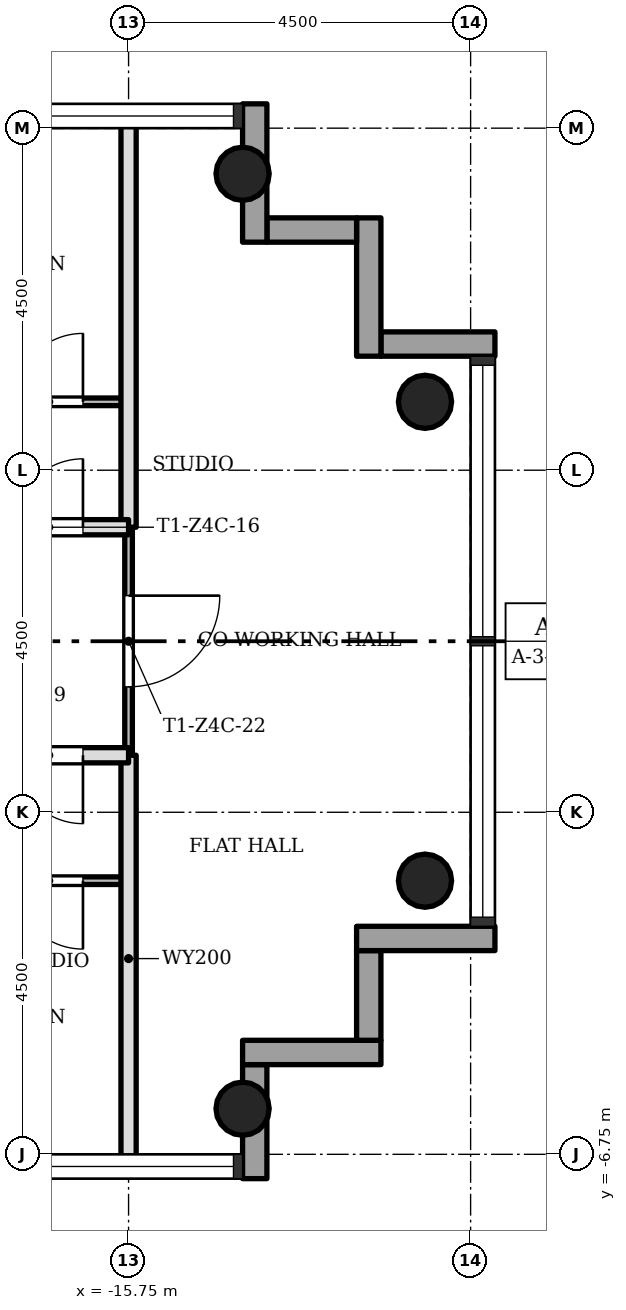
"""IFC4 building model, lengths in metres.
Left out: names, types, materials, properties, quantities, classifications, styles, units other than length and angle.
Written with IfcOpenShell. Run it as: python <this file> out.ifc"""

import sys

from ifc_helpers import new_model, si_unit, direction, frame, frame_2d, origin, origin_2d, place, context, subcontext, project, spatial, rectangle, hollow_circle, extrude, element, fill, save


model = new_model("IFC4")
c1 = context("Model", 3, precision=1e-05, world=origin(), true_north=direction((0.0, 1.0)))
c2 = subcontext(c1, "Body", "Model", "MODEL_VIEW")
j1 = project(units=[si_unit("LENGTHUNIT", "METRE"), si_unit("PLANEANGLEUNIT", "RADIAN")], contexts=[c1])
p1 = place(None, origin())
s1 = spatial("IfcSite", under=j1, at=p1, CompositionType="ELEMENT")
p2 = place(p1, origin())
s2 = spatial("IfcBuilding", under=s1, at=p2, CompositionType="ELEMENT")
p3 = place(p2, frame((0.0, 0.0, 185.8)))
s3 = spatial("IfcBuildingStorey", under=s2, at=p3, CompositionType="ELEMENT", Elevation=185.8)
for number, where, z_axis, x_axis in (
    (1, (-14.25, -6.15, 0.0), (0.0, 0.0, 1.0), (1.0, 0.0, 0.0)),
    (2, (-14.25, 6.15, 0.0), (0.0, 0.0, 1.0), (1.0, 0.0, 0.0)),
    (3, (-11.85, -3.15, 0.0), (0.0, 0.0, 1.0), (1.0, 0.0, 0.0)),
    (4, (-11.85, 3.15, 0.0), (0.0, 0.0, 1.0), (1.0, 0.0, 0.0)),
):
    element("IfcColumn", number, at=place(p3, frame(where, z_axis=z_axis, x_axis=x_axis)), inside=s3, PredefinedType="COLUMN", context=c2, shape_type="SweptSolid", body=[
        extrude(hollow_circle(Radius=0.35, WallThickness=0.025, at=origin_2d()), origin(), (0.0, 0.0, 1.0), 3.4),
    ])
p4 = place(p3, frame((-14.09, -7.07, -0.3), z_axis=(0.0, 0.0, 1.0), x_axis=(0.0, 1.0, 0.0)))
e5 = element("IfcWall", 5, at=p4, inside=s3, PredefinedType="STANDARD", context=c2, shape_type="SweptSolid", body=[
    extrude(rectangle(XDim=1.5, YDim=0.32, at=frame_2d((0.75, 0.0))), origin(), (0.0, 0.0, 1.0), 3.4),
])
p5 = place(p3, frame((-14.25, -5.41, -0.3), z_axis=(0.0, 0.0, 1.0), x_axis=(1.0, 0.0, 0.0)))
e6 = element("IfcWall", 6, at=p5, inside=s3, PredefinedType="STANDARD", context=c2, shape_type="SweptSolid", body=[
    extrude(rectangle(XDim=1.82, YDim=0.32, at=frame_2d((0.91, 0.0))), origin(), (0.0, 0.0, 1.0), 3.4),
])
p6 = place(p3, frame((-12.59, -5.25, -0.3), z_axis=(0.0, 0.0, 1.0), x_axis=(0.0, 1.0, 0.0)))
e7 = element("IfcWall", 7, at=p6, inside=s3, PredefinedType="STANDARD", context=c2, shape_type="SweptSolid", body=[
    extrude(rectangle(XDim=1.18, YDim=0.32, at=frame_2d((0.59, 0.0))), origin(), (0.0, 0.0, 1.0), 3.4),
])
p7 = place(p3, frame((-12.75, -3.91, -0.3), z_axis=(0.0, 0.0, 1.0), x_axis=(1.0, 0.0, 0.0)))
e8 = element("IfcWall", 8, at=p7, inside=s3, PredefinedType="STANDARD", context=c2, shape_type="SweptSolid", body=[
    extrude(rectangle(XDim=1.82, YDim=0.32, at=frame_2d((0.91, 0.0))), origin(), (0.0, 0.0, 1.0), 3.4),
])
p8 = place(p3, frame((-10.93, 3.91, -0.3), z_axis=(0.0, 0.0, 1.0), x_axis=(-1.0, 0.0, 0.0)))
e9 = element("IfcWall", 9, at=p8, inside=s3, PredefinedType="STANDARD", context=c2, shape_type="SweptSolid", body=[
    extrude(rectangle(XDim=1.5, YDim=0.32, at=frame_2d((0.75, 0.0))), origin(), (0.0, 0.0, 1.0), 3.4),
])
p9 = place(p3, frame((-12.59, 3.75, -0.3), z_axis=(0.0, 0.0, 1.0), x_axis=(0.0, 1.0, 0.0)))
e10 = element("IfcWall", 10, at=p9, inside=s3, PredefinedType="STANDARD", context=c2, shape_type="SweptSolid", body=[
    extrude(rectangle(XDim=1.82, YDim=0.32, at=frame_2d((0.91, 0.0))), origin(), (0.0, 0.0, 1.0), 3.4),
])
p10 = place(p3, frame((-12.75, 5.41, -0.3), z_axis=(0.0, 0.0, 1.0), x_axis=(-1.0, 0.0, 0.0)))
e11 = element("IfcWall", 11, at=p10, inside=s3, PredefinedType="STANDARD", context=c2, shape_type="SweptSolid", body=[
    extrude(rectangle(XDim=1.18, YDim=0.32, at=frame_2d((0.59, 0.0))), origin(), (0.0, 0.0, 1.0), 3.4),
])
p11 = place(p3, frame((-14.09, 5.25, -0.3), z_axis=(0.0, 0.0, 1.0), x_axis=(0.0, 1.0, 0.0)))
e12 = element("IfcWall", 12, at=p11, inside=s3, PredefinedType="STANDARD", context=c2, shape_type="SweptSolid", body=[
    extrude(rectangle(XDim=1.82, YDim=0.32, at=frame_2d((0.91, 0.0))), origin(), (0.0, 0.0, 1.0), 3.4),
])
p12 = place(p3, frame((-15.75, -1.5, 0.0), z_axis=(0.0, 0.0, 1.0), x_axis=(0.0, 1.0, 0.0)))
e13 = element("IfcWall", 13, at=p12, inside=s3, PredefinedType="PARTITIONING", context=c2, shape_type="SweptSolid", body=[
    extrude(rectangle(XDim=3.0, YDim=0.1, at=frame_2d((1.5, 0.0))), origin(), (0.0, 0.0, 1.0), 3.0),
])
p13 = place(p12, frame((0.9, 0.0, 0.0)))
e14 = element("IfcOpeningElement", 14, at=p13, cuts=e13, PredefinedType="OPENING", context=c2, shape_type="SweptSolid", body=[
    extrude(rectangle(XDim=1.2, YDim=2.1, at=frame_2d((0.6, 1.05))), frame((0.0, 0.06, 0.0), z_axis=(0.0, -1.0, 0.0), x_axis=(1.0, 0.0, 0.0)), (0.0, 0.0, 1.0), 0.12),
])
for number, where, z_axis, x_axis in (
    (15, (-15.75, -6.85, 0.0), (0.0, 0.0, 1.0), (0.0, 1.0, 0.0)),
    (16, (-15.75, 1.5, 0.0), (0.0, 0.0, 1.0), (0.0, 1.0, 0.0)),
):
    element("IfcWall", number, at=place(p3, frame(where, z_axis=z_axis, x_axis=x_axis)), inside=s3, PredefinedType="SOLIDWALL", context=c2, shape_type="SweptSolid", body=[
        extrude(rectangle(XDim=5.35, YDim=0.2, at=frame_2d((2.675, 0.0))), origin(), (0.0, 0.0, 1.0), 3.0),
    ])
p14 = place(p3, frame((-20.25, -3.15, 0.0), z_axis=(0.0, 0.0, 1.0), x_axis=(1.0, 0.0, 0.0)))
e17 = element("IfcWall", 17, at=p14, inside=s3, PredefinedType="PARTITIONING", context=c2, shape_type="SweptSolid", body=[
    extrude(rectangle(XDim=4.5, YDim=0.1, at=frame_2d((2.25, 0.0))), origin(), (0.0, 0.0, 1.0), 3.0),
])
p15 = place(p14, frame((3.0, 0.0, 0.0)))
e18 = element("IfcOpeningElement", 18, at=p15, cuts=e17, PredefinedType="OPENING", context=c2, shape_type="SweptSolid", body=[
    extrude(rectangle(XDim=0.9, YDim=2.1, at=frame_2d((0.45, 1.05))), frame((0.0, 0.06, 0.0), z_axis=(0.0, -1.0, 0.0), x_axis=(1.0, 0.0, 0.0)), (0.0, 0.0, 1.0), 0.12),
])
p16 = place(p3, frame((-20.25, -1.5, 0.0), z_axis=(0.0, 0.0, 1.0), x_axis=(1.0, 0.0, 0.0)))
e19 = element("IfcWall", 19, at=p16, inside=s3, PredefinedType="SOLIDWALL", context=c2, shape_type="SweptSolid", body=[
    extrude(rectangle(XDim=4.5, YDim=0.2, at=frame_2d((2.25, 0.0))), origin(), (0.0, 0.0, 1.0), 3.0),
])
p17 = place(p16, frame((3.0, 0.0, 0.0)))
e20 = element("IfcOpeningElement", 20, at=p17, cuts=e19, PredefinedType="OPENING", context=c2, shape_type="SweptSolid", body=[
    extrude(rectangle(XDim=0.9, YDim=2.1, at=frame_2d((0.45, 1.05))), frame((0.0, 0.11, 0.0), z_axis=(0.0, -1.0, 0.0), x_axis=(1.0, 0.0, 0.0)), (0.0, 0.0, 1.0), 0.22),
])
p18 = place(p3, frame((-20.25, 1.5, 0.0), z_axis=(0.0, 0.0, 1.0), x_axis=(1.0, 0.0, 0.0)))
e21 = element("IfcWall", 21, at=p18, inside=s3, PredefinedType="SOLIDWALL", context=c2, shape_type="SweptSolid", body=[
    extrude(rectangle(XDim=4.5, YDim=0.2, at=frame_2d((2.25, 0.0))), origin(), (0.0, 0.0, 1.0), 3.0),
])
p19 = place(p18, frame((3.0, 0.0, 0.0)))
e22 = element("IfcOpeningElement", 22, at=p19, cuts=e21, PredefinedType="OPENING", context=c2, shape_type="SweptSolid", body=[
    extrude(rectangle(XDim=0.9, YDim=2.1, at=frame_2d((0.45, 1.05))), frame((0.0, 0.11, 0.0), z_axis=(0.0, -1.0, 0.0), x_axis=(1.0, 0.0, 0.0)), (0.0, 0.0, 1.0), 0.22),
])
p20 = place(p3, frame((-20.25, 3.15, 0.0), z_axis=(0.0, 0.0, 1.0), x_axis=(1.0, 0.0, 0.0)))
e23 = element("IfcWall", 23, at=p20, inside=s3, PredefinedType="PARTITIONING", context=c2, shape_type="SweptSolid", body=[
    extrude(rectangle(XDim=4.5, YDim=0.1, at=frame_2d((2.25, 0.0))), origin(), (0.0, 0.0, 1.0), 3.0),
])
p21 = place(p20, frame((3.0, 0.0, 0.0)))
e24 = element("IfcOpeningElement", 24, at=p21, cuts=e23, PredefinedType="OPENING", context=c2, shape_type="SweptSolid", body=[
    extrude(rectangle(XDim=0.9, YDim=2.1, at=frame_2d((0.45, 1.05))), frame((0.0, 0.06, 0.0), z_axis=(0.0, -1.0, 0.0), x_axis=(1.0, 0.0, 0.0)), (0.0, 0.0, 1.0), 0.12),
])
p22 = place(p19, origin())
e25 = element("IfcDoor", 25, at=p22, inside=s3, OperationType="SINGLE_SWING_LEFT", PredefinedType="DOOR", context=c2, shape_type="SweptSolid", body=[
    extrude(rectangle(XDim=0.9, YDim=2.1, at=frame_2d((0.45, 1.05))), frame((0.0, 0.025, 0.0), z_axis=(0.0, -1.0, 0.0), x_axis=(1.0, 0.0, 0.0)), (0.0, 0.0, 1.0), 0.05),
])
fill(e22, e25)
p23 = place(p21, origin())
e26 = element("IfcDoor", 26, at=p23, inside=s3, OperationType="SINGLE_SWING_LEFT", PredefinedType="DOOR", context=c2, shape_type="SweptSolid", body=[
    extrude(rectangle(XDim=0.9, YDim=2.1, at=frame_2d((0.45, 1.05))), frame((0.0, 0.025, 0.0), z_axis=(0.0, -1.0, 0.0), x_axis=(1.0, 0.0, 0.0)), (0.0, 0.0, 1.0), 0.05),
])
fill(e24, e26)
p24 = place(p17, origin())
e27 = element("IfcDoor", 27, at=p24, inside=s3, OperationType="SINGLE_SWING_RIGHT", PredefinedType="DOOR", context=c2, shape_type="SweptSolid", body=[
    extrude(rectangle(XDim=0.9, YDim=2.1, at=frame_2d((0.45, 1.05))), frame((0.0, 0.025, 0.0), z_axis=(0.0, -1.0, 0.0), x_axis=(1.0, 0.0, 0.0)), (0.0, 0.0, 1.0), 0.05),
])
fill(e20, e27)
p25 = place(p15, origin())
e28 = element("IfcDoor", 28, at=p25, inside=s3, OperationType="SINGLE_SWING_RIGHT", PredefinedType="DOOR", context=c2, shape_type="SweptSolid", body=[
    extrude(rectangle(XDim=0.9, YDim=2.1, at=frame_2d((0.45, 1.05))), frame((0.0, 0.025, 0.0), z_axis=(0.0, -1.0, 0.0), x_axis=(1.0, 0.0, 0.0)), (0.0, 0.0, 1.0), 0.05),
])
fill(e18, e28)
p26 = place(p13, origin())
e29 = element("IfcDoor", 29, at=p26, inside=s3, OperationType="SINGLE_SWING_RIGHT", PredefinedType="DOOR", context=c2, shape_type="SweptSolid", body=[
    extrude(rectangle(XDim=1.2, YDim=2.1, at=frame_2d((0.6, 1.05))), frame((0.0, 0.025, 0.0), z_axis=(0.0, -1.0, 0.0), x_axis=(1.0, 0.0, 0.0)), (0.0, 0.0, 1.0), 0.05),
])
fill(e14, e29)
save(model, sys.argv[1])
